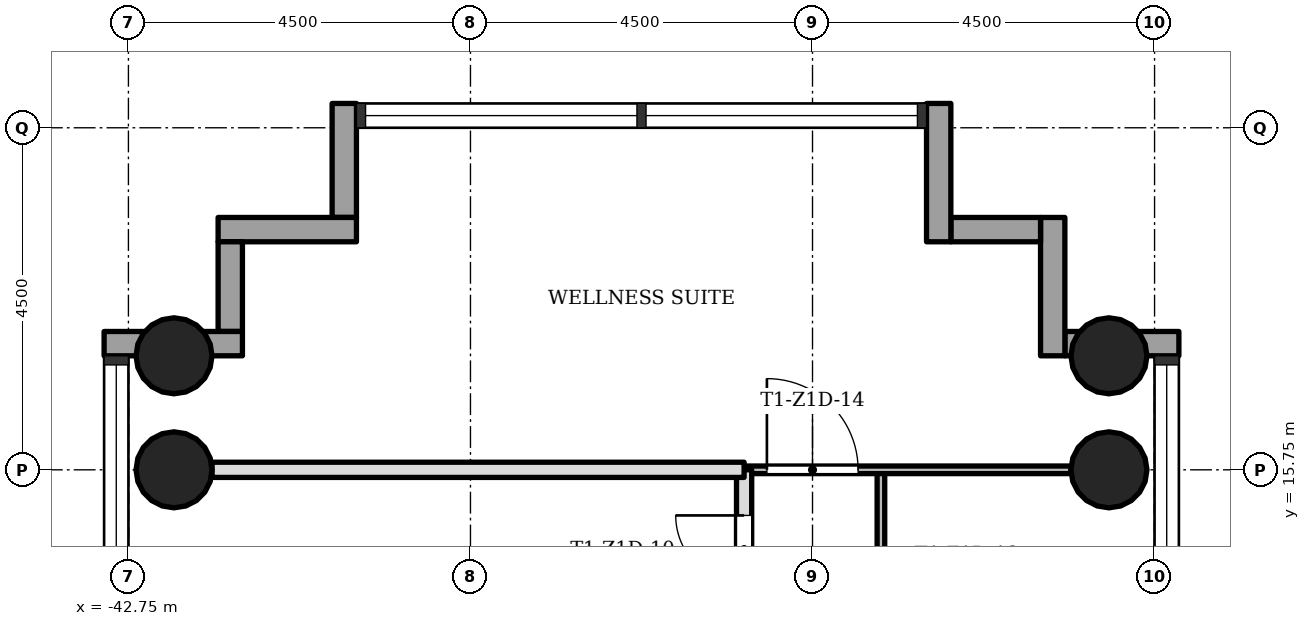
"""IFC4 building model, lengths in metres.
Left out: names, types, materials, properties, quantities, classifications, styles, units other than length and angle.
Written with IfcOpenShell. Run it as: python <this file> out.ifc"""

import sys

from ifc_helpers import new_model, si_unit, direction, frame, frame_2d, origin, origin_2d, place, context, subcontext, project, spatial, rectangle, hollow_circle, extrude, element, fill, save


model = new_model("IFC4")
c1 = context("Model", 3, precision=1e-05, world=origin(), true_north=direction((0.0, 1.0)))
c2 = subcontext(c1, "Body", "Model", "MODEL_VIEW")
j1 = project(units=[si_unit("LENGTHUNIT", "METRE"), si_unit("PLANEANGLEUNIT", "RADIAN")], contexts=[c1])
p1 = place(None, origin())
s1 = spatial("IfcSite", under=j1, at=p1, CompositionType="ELEMENT")
p2 = place(p1, origin())
s2 = spatial("IfcBuilding", under=s1, at=p2, CompositionType="ELEMENT")
p3 = place(p2, frame((0.0, 0.0, 55.1)))
s3 = spatial("IfcBuildingStorey", under=s2, at=p3, CompositionType="ELEMENT", Elevation=55.1)
for number, where, z_axis, x_axis in (
    (1, (-29.85, 15.75, 0.0), (0.0, 0.0, 1.0), (1.0, 0.0, 0.0)),
    (2, (-42.15, 15.75, 0.0), (0.0, 0.0, 1.0), (1.0, 0.0, 0.0)),
    (3, (-29.85, 17.25, 0.0), (0.0, 0.0, 1.0), (1.0, 0.0, 0.0)),
    (4, (-42.15, 17.25, 0.0), (0.0, 0.0, 1.0), (1.0, 0.0, 0.0)),
):
    element("IfcColumn", number, at=place(p3, frame(where, z_axis=z_axis, x_axis=x_axis)), inside=s3, PredefinedType="COLUMN", context=c2, shape_type="SweptSolid", body=[
        extrude(hollow_circle(Radius=0.5, WallThickness=0.036, at=origin_2d()), origin(), (0.0, 0.0, 1.0), 3.4),
    ])
p4 = place(p3, frame((-28.93, 17.41, -0.3), z_axis=(0.0, 0.0, 1.0), x_axis=(-1.0, 0.0, 0.0)))
e5 = element("IfcWall", 5, at=p4, inside=s3, PredefinedType="STANDARD", context=c2, shape_type="SweptSolid", body=[
    extrude(rectangle(XDim=1.5, YDim=0.32, at=frame_2d((0.75, 0.0))), origin(), (0.0, 0.0, 1.0), 3.4),
])
p5 = place(p3, frame((-30.59, 17.25, -0.3), z_axis=(0.0, 0.0, 1.0), x_axis=(0.0, 1.0, 0.0)))
e6 = element("IfcWall", 6, at=p5, inside=s3, PredefinedType="STANDARD", context=c2, shape_type="SweptSolid", body=[
    extrude(rectangle(XDim=1.82, YDim=0.32, at=frame_2d((0.91, 0.0))), origin(), (0.0, 0.0, 1.0), 3.4),
])
p6 = place(p3, frame((-30.75, 18.91, -0.3), z_axis=(0.0, 0.0, 1.0), x_axis=(-1.0, 0.0, 0.0)))
e7 = element("IfcWall", 7, at=p6, inside=s3, PredefinedType="STANDARD", context=c2, shape_type="SweptSolid", body=[
    extrude(rectangle(XDim=1.18, YDim=0.32, at=frame_2d((0.59, 0.0))), origin(), (0.0, 0.0, 1.0), 3.4),
])
p7 = place(p3, frame((-32.09, 18.75, -0.3), z_axis=(0.0, 0.0, 1.0), x_axis=(0.0, 1.0, 0.0)))
e8 = element("IfcWall", 8, at=p7, inside=s3, PredefinedType="STANDARD", context=c2, shape_type="SweptSolid", body=[
    extrude(rectangle(XDim=1.82, YDim=0.32, at=frame_2d((0.91, 0.0))), origin(), (0.0, 0.0, 1.0), 3.4),
])
p8 = place(p3, frame((-39.91, 20.57, -0.3), z_axis=(0.0, 0.0, 1.0), x_axis=(0.0, -1.0, 0.0)))
e9 = element("IfcWall", 9, at=p8, inside=s3, PredefinedType="STANDARD", context=c2, shape_type="SweptSolid", body=[
    extrude(rectangle(XDim=1.5, YDim=0.32, at=frame_2d((0.75, 0.0))), origin(), (0.0, 0.0, 1.0), 3.4),
])
p9 = place(p3, frame((-39.75, 18.91, -0.3), z_axis=(0.0, 0.0, 1.0), x_axis=(-1.0, 0.0, 0.0)))
e10 = element("IfcWall", 10, at=p9, inside=s3, PredefinedType="STANDARD", context=c2, shape_type="SweptSolid", body=[
    extrude(rectangle(XDim=1.82, YDim=0.32, at=frame_2d((0.91, 0.0))), origin(), (0.0, 0.0, 1.0), 3.4),
])
p10 = place(p3, frame((-41.41, 18.75, -0.3), z_axis=(0.0, 0.0, 1.0), x_axis=(0.0, -1.0, 0.0)))
e11 = element("IfcWall", 11, at=p10, inside=s3, PredefinedType="STANDARD", context=c2, shape_type="SweptSolid", body=[
    extrude(rectangle(XDim=1.18, YDim=0.32, at=frame_2d((0.59, 0.0))), origin(), (0.0, 0.0, 1.0), 3.4),
])
p11 = place(p3, frame((-41.25, 17.41, -0.3), z_axis=(0.0, 0.0, 1.0), x_axis=(-1.0, 0.0, 0.0)))
e12 = element("IfcWall", 12, at=p11, inside=s3, PredefinedType="STANDARD", context=c2, shape_type="SweptSolid", body=[
    extrude(rectangle(XDim=1.82, YDim=0.32, at=frame_2d((0.91, 0.0))), origin(), (0.0, 0.0, 1.0), 3.4),
])
p12 = place(p3, frame((-34.65, 11.25, 0.0), z_axis=(0.0, 0.0, 1.0), x_axis=(0.0, 1.0, 0.0)))
e13 = element("IfcWall", 13, at=p12, inside=s3, PredefinedType="SOLIDWALL", context=c2, shape_type="SweptSolid", body=[
    extrude(rectangle(XDim=4.5, YDim=0.2, at=frame_2d((2.25, 0.0))), origin(), (0.0, 0.0, 1.0), 3.0),
])
p13 = place(p12, frame((3.0, 0.0, 0.0)))
e14 = element("IfcOpeningElement", 14, at=p13, cuts=e13, PredefinedType="OPENING", context=c2, shape_type="SweptSolid", body=[
    extrude(rectangle(XDim=0.9, YDim=2.1, at=frame_2d((0.45, 1.05))), frame((0.0, 0.11, 0.0), z_axis=(0.0, -1.0, 0.0), x_axis=(1.0, 0.0, 0.0)), (0.0, 0.0, 1.0), 0.22),
])
p14 = place(p3, frame((-32.85, 6.75, 0.0), z_axis=(0.0, 0.0, 1.0), x_axis=(0.0, 1.0, 0.0)))
e15 = element("IfcWall", 15, at=p14, inside=s3, PredefinedType="PARTITIONING", context=c2, shape_type="SweptSolid", body=[
    extrude(rectangle(XDim=9.0, YDim=0.1, at=frame_2d((4.5, 0.0))), origin(), (0.0, 0.0, 1.0), 3.0),
])
p15 = place(p14, frame((1.8, 0.0, 0.0)))
e16 = element("IfcOpeningElement", 16, at=p15, cuts=e15, PredefinedType="OPENING", context=c2, shape_type="SweptSolid", body=[
    extrude(rectangle(XDim=0.9, YDim=2.1, at=frame_2d((0.45, 1.05))), frame((0.0, 0.06, 0.0), z_axis=(0.0, -1.0, 0.0), x_axis=(1.0, 0.0, 0.0)), (0.0, 0.0, 1.0), 0.12),
])
p16 = place(p14, frame((6.3, 0.0, 0.0)))
e17 = element("IfcOpeningElement", 17, at=p16, cuts=e15, PredefinedType="OPENING", context=c2, shape_type="SweptSolid", body=[
    extrude(rectangle(XDim=0.9, YDim=2.1, at=frame_2d((0.45, 1.05))), frame((0.0, 0.06, 0.0), z_axis=(0.0, -1.0, 0.0), x_axis=(1.0, 0.0, 0.0)), (0.0, 0.0, 1.0), 0.12),
])
p17 = place(p3, frame((-34.65, 15.75, 0.0), z_axis=(0.0, 0.0, 1.0), x_axis=(1.0, 0.0, 0.0)))
e18 = element("IfcWall", 18, at=p17, inside=s3, PredefinedType="PARTITIONING", context=c2, shape_type="SweptSolid", body=[
    extrude(rectangle(XDim=4.3, YDim=0.1, at=frame_2d((2.15, 0.0))), origin(), (0.0, 0.0, 1.0), 3.0),
])
p18 = place(p17, frame((0.3, 0.0, 0.0)))
e19 = element("IfcOpeningElement", 19, at=p18, cuts=e18, PredefinedType="OPENING", context=c2, shape_type="SweptSolid", body=[
    extrude(rectangle(XDim=1.2, YDim=2.1, at=frame_2d((0.6, 1.05))), frame((0.0, 0.06, 0.0), z_axis=(0.0, -1.0, 0.0), x_axis=(1.0, 0.0, 0.0)), (0.0, 0.0, 1.0), 0.12),
])
p19 = place(p3, frame((-41.65, 15.75, 0.0), z_axis=(0.0, 0.0, 1.0), x_axis=(1.0, 0.0, 0.0)))
e20 = element("IfcWall", 20, at=p19, inside=s3, PredefinedType="SOLIDWALL", context=c2, shape_type="SweptSolid", body=[
    extrude(rectangle(XDim=7.0, YDim=0.2, at=frame_2d((3.5, 0.0))), origin(), (0.0, 0.0, 1.0), 3.0),
])
p20 = place(p13, origin())
e21 = element("IfcDoor", 21, at=p20, inside=s3, OperationType="SINGLE_SWING_LEFT", PredefinedType="DOOR", context=c2, shape_type="SweptSolid", body=[
    extrude(rectangle(XDim=0.9, YDim=2.1, at=frame_2d((0.45, 1.05))), frame((0.0, 0.025, 0.0), z_axis=(0.0, -1.0, 0.0), x_axis=(1.0, 0.0, 0.0)), (0.0, 0.0, 1.0), 0.05),
])
fill(e14, e21)
p21 = place(p18, origin())
e22 = element("IfcDoor", 22, at=p21, inside=s3, OperationType="SINGLE_SWING_RIGHT", PredefinedType="DOOR", context=c2, shape_type="SweptSolid", body=[
    extrude(rectangle(XDim=1.2, YDim=2.1, at=frame_2d((0.6, 1.05))), frame((0.0, 0.025, 0.0), z_axis=(0.0, -1.0, 0.0), x_axis=(1.0, 0.0, 0.0)), (0.0, 0.0, 1.0), 0.05),
])
fill(e19, e22)
save(model, sys.argv[1])
